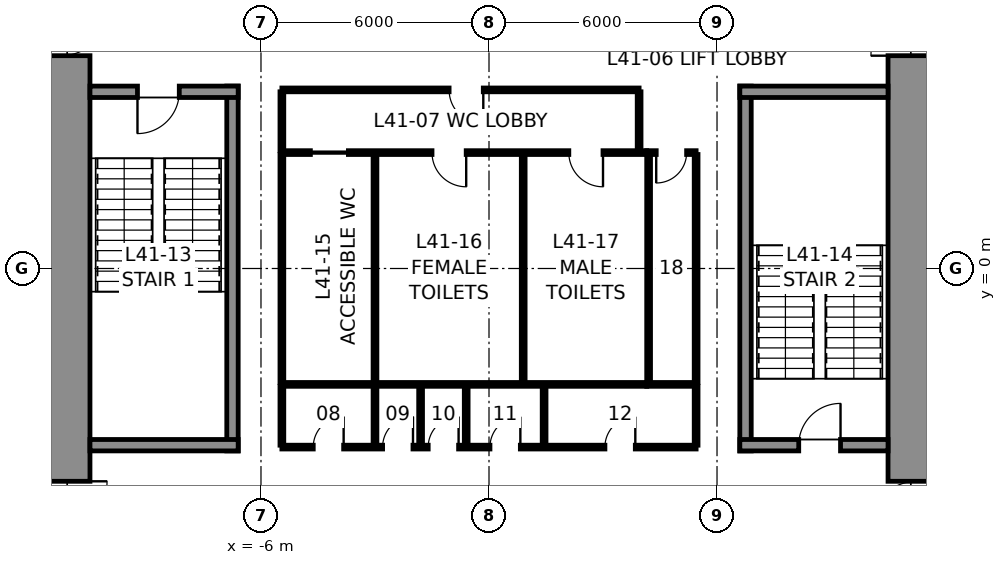
"""IFC4 building model, lengths in metres.
Left out: names, types, materials, properties, quantities, classifications, styles, units other than length and angle.
Written with IfcOpenShell. Run it as: python <this file> out.ifc"""

import sys

from ifc_helpers import new_model, si_unit, direction, frame, frame_2d, origin, place, context, subcontext, project, spatial, rectangle, extrude, element, fill, save


model = new_model("IFC4")
c1 = context("Model", 3, precision=1e-05, world=origin(), true_north=direction((0.0, 1.0)))
c2 = subcontext(c1, "Body", "Model", "MODEL_VIEW")
j1 = project(units=[si_unit("LENGTHUNIT", "METRE"), si_unit("PLANEANGLEUNIT", "RADIAN")], contexts=[c1])
p1 = place(None, origin())
s1 = spatial("IfcSite", under=j1, at=p1, CompositionType="ELEMENT")
p2 = place(p1, origin())
s2 = spatial("IfcBuilding", under=s1, at=p2, CompositionType="ELEMENT")
p3 = place(p2, frame((0.0, 0.0, 191.8)))
s3 = spatial("IfcBuildingStorey", under=s2, at=p3, CompositionType="ELEMENT", Elevation=191.8)
p4 = place(p3, frame((11.25, 10.5, 0.0), z_axis=(0.0, 0.0, 1.0), x_axis=(0.0, -1.0, 0.0)))
e1 = element("IfcWall", 1, at=p4, inside=s3, PredefinedType="SHEAR", context=c2, shape_type="SweptSolid", body=[
    extrude(rectangle(XDim=21.0, YDim=1.5, at=frame_2d((10.5, 0.0))), origin(), (0.0, 0.0, 1.0), 5.0),
])
p5 = place(p4, frame((3.7, 0.0, 0.0)))
e2 = element("IfcOpeningElement", 2, at=p5, cuts=e1, PredefinedType="OPENING", context=c2, shape_type="SweptSolid", body=[
    extrude(rectangle(XDim=1.2, YDim=2.3, at=frame_2d((0.6, 1.15))), frame((0.0, 0.76, 0.0), z_axis=(0.0, -1.0, 0.0), x_axis=(1.0, 0.0, 0.0)), (0.0, 0.0, 1.0), 1.52),
])
p6 = place(p4, frame((16.1, 0.0, 0.0)))
e3 = element("IfcOpeningElement", 3, at=p6, cuts=e1, PredefinedType="OPENING", context=c2, shape_type="SweptSolid", body=[
    extrude(rectangle(XDim=1.2, YDim=2.3, at=frame_2d((0.6, 1.15))), frame((0.0, 0.76, 0.0), z_axis=(0.0, -1.0, 0.0), x_axis=(1.0, 0.0, 0.0)), (0.0, 0.0, 1.0), 1.52),
])
p7 = place(p3, frame((-11.25, -10.5, 0.0), z_axis=(0.0, 0.0, 1.0), x_axis=(0.0, 1.0, 0.0)))
e4 = element("IfcWall", 4, at=p7, inside=s3, PredefinedType="SHEAR", context=c2, shape_type="SweptSolid", body=[
    extrude(rectangle(XDim=21.0, YDim=1.5, at=frame_2d((10.5, 0.0))), origin(), (0.0, 0.0, 1.0), 5.0),
])
p8 = place(p7, frame((16.1, 0.0, 0.0)))
e5 = element("IfcOpeningElement", 5, at=p8, cuts=e4, PredefinedType="OPENING", context=c2, shape_type="SweptSolid", body=[
    extrude(rectangle(XDim=1.2, YDim=2.3, at=frame_2d((0.6, 1.15))), frame((0.0, 0.76, 0.0), z_axis=(0.0, -1.0, 0.0), x_axis=(1.0, 0.0, 0.0)), (0.0, 0.0, 1.0), 1.52),
])
p9 = place(p7, frame((3.7, 0.0, 0.0)))
e6 = element("IfcOpeningElement", 6, at=p9, cuts=e4, PredefinedType="OPENING", context=c2, shape_type="SweptSolid", body=[
    extrude(rectangle(XDim=1.2, YDim=2.3, at=frame_2d((0.6, 1.15))), frame((0.0, 0.76, 0.0), z_axis=(0.0, -1.0, 0.0), x_axis=(1.0, 0.0, 0.0)), (0.0, 0.0, 1.0), 1.52),
])
p10 = place(p3, frame((-6.75, -4.8, 0.0), z_axis=(0.0, 0.0, 1.0), x_axis=(0.0, 1.0, 0.0)))
e7 = element("IfcWall", 7, at=p10, inside=s3, PredefinedType="SOLIDWALL", context=c2, shape_type="SweptSolid", body=[
    extrude(rectangle(XDim=9.6, YDim=0.3, at=frame_2d((4.8, 0.0))), origin(), (0.0, 0.0, 1.0), 4.75),
])
p11 = place(p3, frame((-10.5, 4.65, 0.0), z_axis=(0.0, 0.0, 1.0), x_axis=(1.0, 0.0, 0.0)))
e8 = element("IfcWall", 8, at=p11, inside=s3, PredefinedType="SOLIDWALL", context=c2, shape_type="SweptSolid", body=[
    extrude(rectangle(XDim=3.9, YDim=0.3, at=frame_2d((1.95, 0.0))), origin(), (0.0, 0.0, 1.0), 4.75),
])
p12 = place(p11, frame((1.25, 0.0, 0.0)))
e9 = element("IfcOpeningElement", 9, at=p12, cuts=e8, PredefinedType="OPENING", context=c2, shape_type="SweptSolid", body=[
    extrude(rectangle(XDim=1.1, YDim=2.3, at=frame_2d((0.55, 1.15))), frame((0.0, 0.16, 0.0), z_axis=(0.0, -1.0, 0.0), x_axis=(1.0, 0.0, 0.0)), (0.0, 0.0, 1.0), 0.32),
])
p13 = place(p3, frame((-6.6, -4.65, 0.0), z_axis=(0.0, 0.0, 1.0), x_axis=(-1.0, 0.0, 0.0)))
e10 = element("IfcWall", 10, at=p13, inside=s3, PredefinedType="SOLIDWALL", context=c2, shape_type="SweptSolid", body=[
    extrude(rectangle(XDim=3.9, YDim=0.3, at=frame_2d((1.95, 0.0))), origin(), (0.0, 0.0, 1.0), 4.75),
])
p14 = place(p3, frame((6.75, -4.8, 0.0), z_axis=(0.0, 0.0, 1.0), x_axis=(0.0, 1.0, 0.0)))
e11 = element("IfcWall", 11, at=p14, inside=s3, PredefinedType="SOLIDWALL", context=c2, shape_type="SweptSolid", body=[
    extrude(rectangle(XDim=9.6, YDim=0.3, at=frame_2d((4.8, 0.0))), origin(), (0.0, 0.0, 1.0), 4.75),
])
p15 = place(p3, frame((6.6, 4.65, 0.0), z_axis=(0.0, 0.0, 1.0), x_axis=(1.0, 0.0, 0.0)))
e12 = element("IfcWall", 12, at=p15, inside=s3, PredefinedType="SOLIDWALL", context=c2, shape_type="SweptSolid", body=[
    extrude(rectangle(XDim=3.9, YDim=0.3, at=frame_2d((1.95, 0.0))), origin(), (0.0, 0.0, 1.0), 4.75),
])
p16 = place(p3, frame((10.5, -4.65, 0.0), z_axis=(0.0, 0.0, 1.0), x_axis=(-1.0, 0.0, 0.0)))
e13 = element("IfcWall", 13, at=p16, inside=s3, PredefinedType="SOLIDWALL", context=c2, shape_type="SweptSolid", body=[
    extrude(rectangle(XDim=3.9, YDim=0.3, at=frame_2d((1.95, 0.0))), origin(), (0.0, 0.0, 1.0), 4.75),
])
p17 = place(p16, frame((1.25, 0.0, 0.0)))
e14 = element("IfcOpeningElement", 14, at=p17, cuts=e13, PredefinedType="OPENING", context=c2, shape_type="SweptSolid", body=[
    extrude(rectangle(XDim=1.1, YDim=2.3, at=frame_2d((0.55, 1.15))), frame((0.0, 0.16, 0.0), z_axis=(0.0, -1.0, 0.0), x_axis=(1.0, 0.0, 0.0)), (0.0, 0.0, 1.0), 0.32),
])
p18 = place(p3, frame((-5.45, 3.05, 0.0), z_axis=(0.0, 0.0, 1.0), x_axis=(1.0, 0.0, 0.0)))
e15 = element("IfcWall", 15, at=p18, inside=s3, PredefinedType="PARTITIONING", context=c2, shape_type="SweptSolid", body=[
    extrude(rectangle(XDim=9.6, YDim=0.1, at=frame_2d((4.8, 0.0))), origin(), (0.0, 0.0, 1.0), 4.75),
])
p19 = place(p18, frame((0.75, 0.0, 0.0)))
e16 = element("IfcOpeningElement", 16, at=p19, cuts=e15, PredefinedType="OPENING", context=c2, shape_type="SweptSolid", body=[
    extrude(rectangle(XDim=1.0, YDim=2.3, at=frame_2d((0.5, 1.15))), frame((0.0, 0.06, 0.0), z_axis=(0.0, -1.0, 0.0), x_axis=(1.0, 0.0, 0.0)), (0.0, 0.0, 1.0), 0.12),
])
p20 = place(p18, frame((3.95, 0.0, 0.0)))
e17 = element("IfcOpeningElement", 17, at=p20, cuts=e15, PredefinedType="OPENING", context=c2, shape_type="SweptSolid", body=[
    extrude(rectangle(XDim=0.9, YDim=2.3, at=frame_2d((0.45, 1.15))), frame((0.0, 0.06, 0.0), z_axis=(0.0, -1.0, 0.0), x_axis=(1.0, 0.0, 0.0)), (0.0, 0.0, 1.0), 0.12),
])
p21 = place(p18, frame((7.55, 0.0, 0.0)))
e18 = element("IfcOpeningElement", 18, at=p21, cuts=e15, PredefinedType="OPENING", context=c2, shape_type="SweptSolid", body=[
    extrude(rectangle(XDim=0.9, YDim=2.3, at=frame_2d((0.45, 1.15))), frame((0.0, 0.06, 0.0), z_axis=(0.0, -1.0, 0.0), x_axis=(1.0, 0.0, 0.0)), (0.0, 0.0, 1.0), 0.12),
])
p22 = place(p3, frame((4.15, 3.05, 0.0), z_axis=(0.0, 0.0, 1.0), x_axis=(1.0, 0.0, 0.0)))
e19 = element("IfcWall", 19, at=p22, inside=s3, PredefinedType="PARTITIONING", context=c2, shape_type="SweptSolid", body=[
    extrude(rectangle(XDim=1.3, YDim=0.1, at=frame_2d((0.65, 0.0))), origin(), (0.0, 0.0, 1.0), 4.75),
])
p23 = place(p22, frame((0.25, 0.0, 0.0)))
e20 = element("IfcOpeningElement", 20, at=p23, cuts=e19, PredefinedType="OPENING", context=c2, shape_type="SweptSolid", body=[
    extrude(rectangle(XDim=0.8, YDim=2.3, at=frame_2d((0.4, 1.15))), frame((0.0, 0.06, 0.0), z_axis=(0.0, -1.0, 0.0), x_axis=(1.0, 0.0, 0.0)), (0.0, 0.0, 1.0), 0.12),
])
p24 = place(p3, frame((4.15, -3.05, 0.0), z_axis=(0.0, 0.0, 1.0), x_axis=(-1.0, 0.0, 0.0)))
e21 = element("IfcWall", 21, at=p24, inside=s3, PredefinedType="PARTITIONING", context=c2, shape_type="SweptSolid", body=[
    extrude(rectangle(XDim=9.6, YDim=0.1, at=frame_2d((4.8, 0.0))), origin(), (0.0, 0.0, 1.0), 4.75),
])
p25 = place(p3, frame((5.45, -3.05, 0.0), z_axis=(0.0, 0.0, 1.0), x_axis=(-1.0, 0.0, 0.0)))
e22 = element("IfcWall", 22, at=p25, inside=s3, PredefinedType="PARTITIONING", context=c2, shape_type="SweptSolid", body=[
    extrude(rectangle(XDim=1.3, YDim=0.1, at=frame_2d((0.65, 0.0))), origin(), (0.0, 0.0, 1.0), 4.75),
])
for number, where, z_axis, x_axis in (
    (23, (5.45, 3.0, 0.0), (0.0, 0.0, 1.0), (0.0, -1.0, 0.0)),
    (24, (-5.45, -3.0, 0.0), (0.0, 0.0, 1.0), (0.0, 1.0, 0.0)),
    (25, (-3.0, -3.0, 0.0), (0.0, 0.0, 1.0), (0.0, 1.0, 0.0)),
    (26, (0.9, -3.0, 0.0), (0.0, 0.0, 1.0), (0.0, 1.0, 0.0)),
    (27, (4.2, -3.0, 0.0), (0.0, 0.0, 1.0), (0.0, 1.0, 0.0)),
):
    element("IfcWall", number, at=place(p3, frame(where, z_axis=z_axis, x_axis=x_axis)), inside=s3, PredefinedType="PARTITIONING", context=c2, shape_type="SweptSolid", body=[
        extrude(rectangle(XDim=6.0, YDim=0.1, at=frame_2d((3.0, 0.0))), origin(), (0.0, 0.0, 1.0), 4.75),
    ])
p26 = place(p3, frame((-5.45, 4.7, 0.0), z_axis=(0.0, 0.0, 1.0), x_axis=(1.0, 0.0, 0.0)))
e28 = element("IfcWall", 28, at=p26, inside=s3, PredefinedType="PARTITIONING", context=c2, shape_type="SweptSolid", body=[
    extrude(rectangle(XDim=9.4, YDim=0.1, at=frame_2d((4.7, 0.0))), origin(), (0.0, 0.0, 1.0), 4.75),
])
p27 = place(p26, frame((4.4, 0.0, 0.0)))
e29 = element("IfcOpeningElement", 29, at=p27, cuts=e28, PredefinedType="OPENING", context=c2, shape_type="SweptSolid", body=[
    extrude(rectangle(XDim=0.9, YDim=2.3, at=frame_2d((0.45, 1.15))), frame((0.0, 0.06, 0.0), z_axis=(0.0, -1.0, 0.0), x_axis=(1.0, 0.0, 0.0)), (0.0, 0.0, 1.0), 0.12),
])
for number, where, z_axis, x_axis in (
    (30, (-5.45, 3.1, 0.0), (0.0, 0.0, 1.0), (0.0, 1.0, 0.0)),
    (31, (3.95, 3.1, 0.0), (0.0, 0.0, 1.0), (0.0, 1.0, 0.0)),
):
    element("IfcWall", number, at=place(p3, frame(where, z_axis=z_axis, x_axis=x_axis)), inside=s3, PredefinedType="PARTITIONING", context=c2, shape_type="SweptSolid", body=[
        extrude(rectangle(XDim=1.55, YDim=0.1, at=frame_2d((0.775, 0.0))), origin(), (0.0, 0.0, 1.0), 4.75),
    ])
p28 = place(p3, frame((5.45, -4.7, 0.0), z_axis=(0.0, 0.0, 1.0), x_axis=(-1.0, 0.0, 0.0)))
e32 = element("IfcWall", 32, at=p28, inside=s3, PredefinedType="PARTITIONING", context=c2, shape_type="SweptSolid", body=[
    extrude(rectangle(XDim=10.9, YDim=0.1, at=frame_2d((5.45, 0.0))), origin(), (0.0, 0.0, 1.0), 4.75),
])
p29 = place(p28, frame((9.275, 0.0, 0.0)))
e33 = element("IfcOpeningElement", 33, at=p29, cuts=e32, PredefinedType="OPENING", context=c2, shape_type="SweptSolid", body=[
    extrude(rectangle(XDim=0.8, YDim=2.3, at=frame_2d((0.4, 1.15))), frame((0.0, 0.06, 0.0), z_axis=(0.0, -1.0, 0.0), x_axis=(1.0, 0.0, 0.0)), (0.0, 0.0, 1.0), 0.12),
])
p30 = place(p28, frame((7.45, 0.0, 0.0)))
e34 = element("IfcOpeningElement", 34, at=p30, cuts=e32, PredefinedType="OPENING", context=c2, shape_type="SweptSolid", body=[
    extrude(rectangle(XDim=0.8, YDim=2.3, at=frame_2d((0.4, 1.15))), frame((0.0, 0.06, 0.0), z_axis=(0.0, -1.0, 0.0), x_axis=(1.0, 0.0, 0.0)), (0.0, 0.0, 1.0), 0.12),
])
p31 = place(p28, frame((6.25, 0.0, 0.0)))
e35 = element("IfcOpeningElement", 35, at=p31, cuts=e32, PredefinedType="OPENING", context=c2, shape_type="SweptSolid", body=[
    extrude(rectangle(XDim=0.8, YDim=2.3, at=frame_2d((0.4, 1.15))), frame((0.0, 0.06, 0.0), z_axis=(0.0, -1.0, 0.0), x_axis=(1.0, 0.0, 0.0)), (0.0, 0.0, 1.0), 0.12),
])
p32 = place(p28, frame((4.625, 0.0, 0.0)))
e36 = element("IfcOpeningElement", 36, at=p32, cuts=e32, PredefinedType="OPENING", context=c2, shape_type="SweptSolid", body=[
    extrude(rectangle(XDim=0.8, YDim=2.3, at=frame_2d((0.4, 1.15))), frame((0.0, 0.06, 0.0), z_axis=(0.0, -1.0, 0.0), x_axis=(1.0, 0.0, 0.0)), (0.0, 0.0, 1.0), 0.12),
])
p33 = place(p28, frame((1.6, 0.0, 0.0)))
e37 = element("IfcOpeningElement", 37, at=p33, cuts=e32, PredefinedType="OPENING", context=c2, shape_type="SweptSolid", body=[
    extrude(rectangle(XDim=0.8, YDim=2.3, at=frame_2d((0.4, 1.15))), frame((0.0, 0.06, 0.0), z_axis=(0.0, -1.0, 0.0), x_axis=(1.0, 0.0, 0.0)), (0.0, 0.0, 1.0), 0.12),
])
for number, where, z_axis, x_axis in (
    (38, (-5.45, -3.1, 0.0), (0.0, 0.0, 1.0), (0.0, -1.0, 0.0)),
    (39, (5.45, -3.1, 0.0), (0.0, 0.0, 1.0), (0.0, -1.0, 0.0)),
    (40, (-3.0, -3.1, 0.0), (0.0, 0.0, 1.0), (0.0, -1.0, 0.0)),
    (41, (-1.8, -3.1, 0.0), (0.0, 0.0, 1.0), (0.0, -1.0, 0.0)),
    (42, (-0.6, -3.1, 0.0), (0.0, 0.0, 1.0), (0.0, -1.0, 0.0)),
    (43, (1.45, -3.1, 0.0), (0.0, 0.0, 1.0), (0.0, -1.0, 0.0)),
):
    element("IfcWall", number, at=place(p3, frame(where, z_axis=z_axis, x_axis=x_axis)), inside=s3, PredefinedType="PARTITIONING", context=c2, shape_type="SweptSolid", body=[
        extrude(rectangle(XDim=1.55, YDim=0.1, at=frame_2d((0.775, 0.0))), origin(), (0.0, 0.0, 1.0), 4.75),
    ])
p34 = place(p12, frame((1.1, 0.0, 0.0), z_axis=(0.0, 0.0, 1.0), x_axis=(-1.0, 0.0, 0.0)))
e44 = element("IfcDoor", 44, at=p34, inside=s3, OperationType="SINGLE_SWING_RIGHT", PredefinedType="DOOR", context=c2, shape_type="SweptSolid", body=[
    extrude(rectangle(XDim=1.1, YDim=2.3, at=frame_2d((0.55, 1.15))), frame((0.0, 0.025, 0.0), z_axis=(0.0, -1.0, 0.0), x_axis=(1.0, 0.0, 0.0)), (0.0, 0.0, 1.0), 0.05),
])
fill(e9, e44)
p35 = place(p17, frame((1.1, 0.0, 0.0), z_axis=(0.0, 0.0, 1.0), x_axis=(-1.0, 0.0, 0.0)))
e45 = element("IfcDoor", 45, at=p35, inside=s3, OperationType="SINGLE_SWING_RIGHT", PredefinedType="DOOR", context=c2, shape_type="SweptSolid", body=[
    extrude(rectangle(XDim=1.1, YDim=2.3, at=frame_2d((0.55, 1.15))), frame((0.0, 0.025, 0.0), z_axis=(0.0, -1.0, 0.0), x_axis=(1.0, 0.0, 0.0)), (0.0, 0.0, 1.0), 0.05),
])
fill(e14, e45)
p36 = place(p19, frame((1.0, 0.0, 0.0), z_axis=(0.0, 0.0, 1.0), x_axis=(-1.0, 0.0, 0.0)))
e46 = element("IfcDoor", 46, at=p36, inside=s3, OperationType="SLIDING_TO_LEFT", PredefinedType="DOOR", context=c2, shape_type="SweptSolid", body=[
    extrude(rectangle(XDim=1.0, YDim=2.3, at=frame_2d((0.5, 1.15))), frame((0.0, 0.025, 0.0), z_axis=(0.0, -1.0, 0.0), x_axis=(1.0, 0.0, 0.0)), (0.0, 0.0, 1.0), 0.05),
])
fill(e16, e46)
p37 = place(p20, frame((0.9, 0.0, 0.0), z_axis=(0.0, 0.0, 1.0), x_axis=(-1.0, 0.0, 0.0)))
e47 = element("IfcDoor", 47, at=p37, inside=s3, OperationType="SINGLE_SWING_LEFT", PredefinedType="DOOR", context=c2, shape_type="SweptSolid", body=[
    extrude(rectangle(XDim=0.9, YDim=2.3, at=frame_2d((0.45, 1.15))), frame((0.0, 0.025, 0.0), z_axis=(0.0, -1.0, 0.0), x_axis=(1.0, 0.0, 0.0)), (0.0, 0.0, 1.0), 0.05),
])
fill(e17, e47)
p38 = place(p21, frame((0.9, 0.0, 0.0), z_axis=(0.0, 0.0, 1.0), x_axis=(-1.0, 0.0, 0.0)))
e48 = element("IfcDoor", 48, at=p38, inside=s3, OperationType="SINGLE_SWING_LEFT", PredefinedType="DOOR", context=c2, shape_type="SweptSolid", body=[
    extrude(rectangle(XDim=0.9, YDim=2.3, at=frame_2d((0.45, 1.15))), frame((0.0, 0.025, 0.0), z_axis=(0.0, -1.0, 0.0), x_axis=(1.0, 0.0, 0.0)), (0.0, 0.0, 1.0), 0.05),
])
fill(e18, e48)
p39 = place(p23, frame((0.8, 0.0, 0.0), z_axis=(0.0, 0.0, 1.0), x_axis=(-1.0, 0.0, 0.0)))
e49 = element("IfcDoor", 49, at=p39, inside=s3, OperationType="SINGLE_SWING_RIGHT", PredefinedType="DOOR", context=c2, shape_type="SweptSolid", body=[
    extrude(rectangle(XDim=0.8, YDim=2.3, at=frame_2d((0.4, 1.15))), frame((0.0, 0.025, 0.0), z_axis=(0.0, -1.0, 0.0), x_axis=(1.0, 0.0, 0.0)), (0.0, 0.0, 1.0), 0.05),
])
fill(e20, e49)
p40 = place(p27, frame((0.9, 0.0, 0.0), z_axis=(0.0, 0.0, 1.0), x_axis=(-1.0, 0.0, 0.0)))
e50 = element("IfcDoor", 50, at=p40, inside=s3, OperationType="SINGLE_SWING_LEFT", PredefinedType="DOOR", context=c2, shape_type="SweptSolid", body=[
    extrude(rectangle(XDim=0.9, YDim=2.3, at=frame_2d((0.45, 1.15))), frame((0.0, 0.025, 0.0), z_axis=(0.0, -1.0, 0.0), x_axis=(1.0, 0.0, 0.0)), (0.0, 0.0, 1.0), 0.05),
])
fill(e29, e50)
p41 = place(p29, frame((0.8, 0.0, 0.0), z_axis=(0.0, 0.0, 1.0), x_axis=(-1.0, 0.0, 0.0)))
e51 = element("IfcDoor", 51, at=p41, inside=s3, OperationType="SINGLE_SWING_RIGHT", PredefinedType="DOOR", context=c2, shape_type="SweptSolid", body=[
    extrude(rectangle(XDim=0.8, YDim=2.3, at=frame_2d((0.4, 1.15))), frame((0.0, 0.025, 0.0), z_axis=(0.0, -1.0, 0.0), x_axis=(1.0, 0.0, 0.0)), (0.0, 0.0, 1.0), 0.05),
])
fill(e33, e51)
p42 = place(p30, frame((0.8, 0.0, 0.0), z_axis=(0.0, 0.0, 1.0), x_axis=(-1.0, 0.0, 0.0)))
e52 = element("IfcDoor", 52, at=p42, inside=s3, OperationType="SINGLE_SWING_RIGHT", PredefinedType="DOOR", context=c2, shape_type="SweptSolid", body=[
    extrude(rectangle(XDim=0.8, YDim=2.3, at=frame_2d((0.4, 1.15))), frame((0.0, 0.025, 0.0), z_axis=(0.0, -1.0, 0.0), x_axis=(1.0, 0.0, 0.0)), (0.0, 0.0, 1.0), 0.05),
])
fill(e34, e52)
p43 = place(p31, frame((0.8, 0.0, 0.0), z_axis=(0.0, 0.0, 1.0), x_axis=(-1.0, 0.0, 0.0)))
e53 = element("IfcDoor", 53, at=p43, inside=s3, OperationType="SINGLE_SWING_RIGHT", PredefinedType="DOOR", context=c2, shape_type="SweptSolid", body=[
    extrude(rectangle(XDim=0.8, YDim=2.3, at=frame_2d((0.4, 1.15))), frame((0.0, 0.025, 0.0), z_axis=(0.0, -1.0, 0.0), x_axis=(1.0, 0.0, 0.0)), (0.0, 0.0, 1.0), 0.05),
])
fill(e35, e53)
p44 = place(p32, frame((0.8, 0.0, 0.0), z_axis=(0.0, 0.0, 1.0), x_axis=(-1.0, 0.0, 0.0)))
e54 = element("IfcDoor", 54, at=p44, inside=s3, OperationType="SINGLE_SWING_RIGHT", PredefinedType="DOOR", context=c2, shape_type="SweptSolid", body=[
    extrude(rectangle(XDim=0.8, YDim=2.3, at=frame_2d((0.4, 1.15))), frame((0.0, 0.025, 0.0), z_axis=(0.0, -1.0, 0.0), x_axis=(1.0, 0.0, 0.0)), (0.0, 0.0, 1.0), 0.05),
])
fill(e36, e54)
p45 = place(p33, frame((0.8, 0.0, 0.0), z_axis=(0.0, 0.0, 1.0), x_axis=(-1.0, 0.0, 0.0)))
e55 = element("IfcDoor", 55, at=p45, inside=s3, OperationType="SINGLE_SWING_RIGHT", PredefinedType="DOOR", context=c2, shape_type="SweptSolid", body=[
    extrude(rectangle(XDim=0.8, YDim=2.3, at=frame_2d((0.4, 1.15))), frame((0.0, 0.025, 0.0), z_axis=(0.0, -1.0, 0.0), x_axis=(1.0, 0.0, 0.0)), (0.0, 0.0, 1.0), 0.05),
])
fill(e37, e55)
p46 = place(p8, frame((1.2, 0.0, 0.0), z_axis=(0.0, 0.0, 1.0), x_axis=(-1.0, 0.0, 0.0)))
e56 = element("IfcDoor", 56, at=p46, inside=s3, OperationType="SINGLE_SWING_LEFT", PredefinedType="DOOR", context=c2, shape_type="SweptSolid", body=[
    extrude(rectangle(XDim=1.2, YDim=2.3, at=frame_2d((0.6, 1.15))), frame((0.0, 0.025, 0.0), z_axis=(0.0, -1.0, 0.0), x_axis=(1.0, 0.0, 0.0)), (0.0, 0.0, 1.0), 0.05),
])
fill(e5, e56)
p47 = place(p9, frame((1.2, 0.0, 0.0), z_axis=(0.0, 0.0, 1.0), x_axis=(-1.0, 0.0, 0.0)))
e57 = element("IfcDoor", 57, at=p47, inside=s3, OperationType="SINGLE_SWING_LEFT", PredefinedType="DOOR", context=c2, shape_type="SweptSolid", body=[
    extrude(rectangle(XDim=1.2, YDim=2.3, at=frame_2d((0.6, 1.15))), frame((0.0, 0.025, 0.0), z_axis=(0.0, -1.0, 0.0), x_axis=(1.0, 0.0, 0.0)), (0.0, 0.0, 1.0), 0.05),
])
fill(e6, e57)
p48 = place(p5, frame((1.2, 0.0, 0.0), z_axis=(0.0, 0.0, 1.0), x_axis=(-1.0, 0.0, 0.0)))
e58 = element("IfcDoor", 58, at=p48, inside=s3, OperationType="SINGLE_SWING_LEFT", PredefinedType="DOOR", context=c2, shape_type="SweptSolid", body=[
    extrude(rectangle(XDim=1.2, YDim=2.3, at=frame_2d((0.6, 1.15))), frame((0.0, 0.025, 0.0), z_axis=(0.0, -1.0, 0.0), x_axis=(1.0, 0.0, 0.0)), (0.0, 0.0, 1.0), 0.05),
])
fill(e2, e58)
p49 = place(p6, frame((1.2, 0.0, 0.0), z_axis=(0.0, 0.0, 1.0), x_axis=(-1.0, 0.0, 0.0)))
e59 = element("IfcDoor", 59, at=p49, inside=s3, OperationType="SINGLE_SWING_LEFT", PredefinedType="DOOR", context=c2, shape_type="SweptSolid", body=[
    extrude(rectangle(XDim=1.2, YDim=2.3, at=frame_2d((0.6, 1.15))), frame((0.0, 0.025, 0.0), z_axis=(0.0, -1.0, 0.0), x_axis=(1.0, 0.0, 0.0)), (0.0, 0.0, 1.0), 0.05),
])
fill(e3, e59)
save(model, sys.argv[1])
